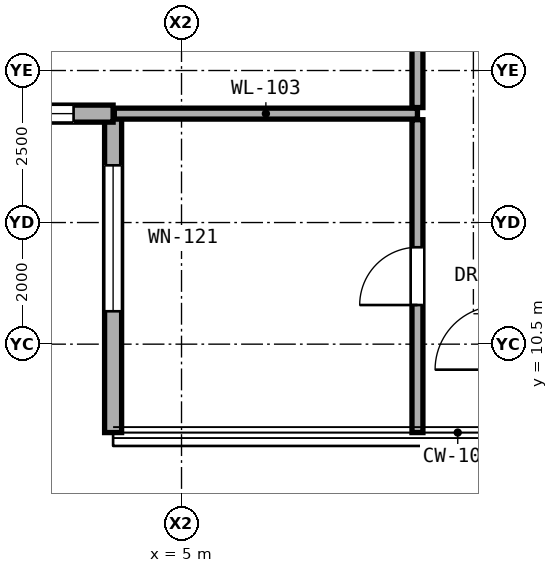
"""IFC4 building model, lengths in metres.
Left out: names, types, materials, properties, quantities, classifications, styles, units other than length and angle.
Written with IfcOpenShell. Run it as: python <this file> out.ifc"""

import sys

from ifc_helpers import new_model, si_unit, direction, frame, frame_2d, origin, place, context, subcontext, project, spatial, rectangle, extrude, element, fill, save


model = new_model("IFC4")
c1 = context("Model", 3, precision=1e-05, world=origin(), true_north=direction((0.0, 1.0)))
c2 = subcontext(c1, "Body", "Model", "MODEL_VIEW")
j1 = project(units=[si_unit("LENGTHUNIT", "METRE"), si_unit("PLANEANGLEUNIT", "RADIAN")], contexts=[c1])
p1 = place(None, origin())
s1 = spatial("IfcSite", under=j1, at=p1, CompositionType="ELEMENT")
p2 = place(p1, origin())
s2 = spatial("IfcBuilding", under=s1, at=p2, CompositionType="ELEMENT")
p3 = place(p2, frame((0.0, 0.0, 180.4)))
s3 = spatial("IfcBuildingStorey", under=s2, at=p3, CompositionType="ELEMENT", Elevation=180.4)
p4 = place(p3, frame((3.875, 14.291, 0.0), z_axis=(0.0, 0.0, 1.0), x_axis=(0.0, -1.0, 0.0)))
e1 = element("IfcWall", 1, at=p4, inside=s3, PredefinedType="SOLIDWALL", context=c2, shape_type="SweptSolid", body=[
    extrude(rectangle(XDim=5.245, YDim=0.28, at=frame_2d((2.623, 0.0))), origin(), (0.0, 0.0, 1.0), 3.03),
])
p5 = place(p4, frame((0.85, 0.0, 0.53)))
e2 = element("IfcOpeningElement", 2, at=p5, cuts=e1, PredefinedType="OPENING", context=c2, shape_type="SweptSolid", body=[
    extrude(rectangle(XDim=2.4, YDim=2.35, at=frame_2d((1.2, 1.175))), frame((0.0, 0.15, 0.0), z_axis=(0.0, -1.0, 0.0), x_axis=(1.0, 0.0, 0.0)), (0.0, 0.0, 1.0), 0.3),
])
p6 = place(p3, frame((-1.37, 14.291, 0.0), z_axis=(0.0, 0.0, 1.0), x_axis=(1.0, 0.0, 0.0)))
e3 = element("IfcWall", 3, at=p6, inside=s3, PredefinedType="SOLIDWALL", context=c2, shape_type="SweptSolid", body=[
    extrude(rectangle(XDim=5.245, YDim=0.28, at=frame_2d((2.623, 0.0))), origin(), (0.0, 0.0, 1.0), 3.03),
])
p7 = place(p6, frame((3.495, 0.0, 0.85)))
e4 = element("IfcOpeningElement", 4, at=p7, cuts=e3, PredefinedType="OPENING", context=c2, shape_type="SweptSolid", body=[
    extrude(rectangle(XDim=1.1, YDim=2.0, at=frame_2d((0.55, 1.0))), frame((0.0, 0.15, 0.0), z_axis=(0.0, -1.0, 0.0), x_axis=(1.0, 0.0, 0.0)), (0.0, 0.0, 1.0), 0.3),
])
p8 = place(p3, frame((3.895, 14.291, 0.0), z_axis=(0.0, 0.0, 1.0), x_axis=(1.0, 0.0, 0.0)))
e5 = element("IfcWall", 5, at=p8, inside=s3, PredefinedType="PARTITIONING", context=c2, shape_type="SweptSolid", body=[
    extrude(rectangle(XDim=4.985, YDim=0.18, at=frame_2d((2.492, 0.0))), origin(), (0.0, 0.0, 1.0), 3.05),
])
p9 = place(p3, frame((8.88, 9.046, 0.0), z_axis=(0.0, 0.0, 1.0), x_axis=(0.0, 1.0, 0.0)))
e6 = element("IfcWall", 6, at=p9, inside=s3, PredefinedType="PARTITIONING", context=c2, shape_type="SweptSolid", body=[
    extrude(rectangle(XDim=5.145, YDim=0.18, at=frame_2d((2.573, 0.0))), origin(), (0.0, 0.0, 1.0), 3.05),
])
p10 = place(p9, frame((2.097, 0.0, 0.0)))
e7 = element("IfcOpeningElement", 7, at=p10, cuts=e6, PredefinedType="OPENING", context=c2, shape_type="SweptSolid", body=[
    extrude(rectangle(XDim=0.95, YDim=2.15, at=frame_2d((0.475, 1.075))), frame((0.0, 0.1, 0.0), z_axis=(0.0, -1.0, 0.0), x_axis=(1.0, 0.0, 0.0)), (0.0, 0.0, 1.0), 0.2),
])
p11 = place(p3, frame((8.88, 14.391, 0.0), z_axis=(0.0, 0.0, 1.0), x_axis=(0.0, 1.0, 0.0)))
e8 = element("IfcWall", 8, at=p11, inside=s3, PredefinedType="PARTITIONING", context=c2, shape_type="SweptSolid", body=[
    extrude(rectangle(XDim=4.671, YDim=0.18, at=frame_2d((2.335, 0.0))), origin(), (0.0, 0.0, 1.0), 2.442),
])
p12 = place(p11, frame((2.41, 0.0, 0.0)))
e9 = element("IfcOpeningElement", 9, at=p12, cuts=e8, PredefinedType="OPENING", context=c2, shape_type="SweptSolid", body=[
    extrude(rectangle(XDim=1.05, YDim=2.2, at=frame_2d((0.525, 1.1))), frame((0.0, 0.1, 0.0), z_axis=(0.0, -1.0, 0.0), x_axis=(1.0, 0.0, 0.0)), (0.0, 0.0, 1.0), 0.2),
])
p13 = place(p5, origin())
e10 = element("IfcWindow", 10, at=p13, inside=s3, PartitioningType="SINGLE_PANEL", PredefinedType="WINDOW", context=c2, shape_type="SweptSolid", body=[
    extrude(rectangle(XDim=2.4, YDim=2.35, at=frame_2d((1.2, 1.175))), frame((0.0, 0.03, 0.0), z_axis=(0.0, -1.0, 0.0), x_axis=(1.0, 0.0, 0.0)), (0.0, 0.0, 1.0), 0.06),
])
fill(e2, e10)
p14 = place(p7, origin())
e11 = element("IfcWindow", 11, at=p14, inside=s3, PartitioningType="SINGLE_PANEL", PredefinedType="WINDOW", context=c2, shape_type="SweptSolid", body=[
    extrude(rectangle(XDim=1.1, YDim=2.0, at=frame_2d((0.55, 1.0))), frame((0.0, 0.03, 0.0), z_axis=(0.0, -1.0, 0.0), x_axis=(1.0, 0.0, 0.0)), (0.0, 0.0, 1.0), 0.06),
])
fill(e4, e11)
p15 = place(p10, origin())
e12 = element("IfcDoor", 12, at=p15, inside=s3, OperationType="SINGLE_SWING_LEFT", PredefinedType="DOOR", context=c2, shape_type="SweptSolid", body=[
    extrude(rectangle(XDim=0.95, YDim=2.15, at=frame_2d((0.475, 1.075))), frame((0.0, 0.025, 0.0), z_axis=(0.0, -1.0, 0.0), x_axis=(1.0, 0.0, 0.0)), (0.0, 0.0, 1.0), 0.05),
])
fill(e7, e12)
save(model, sys.argv[1])
